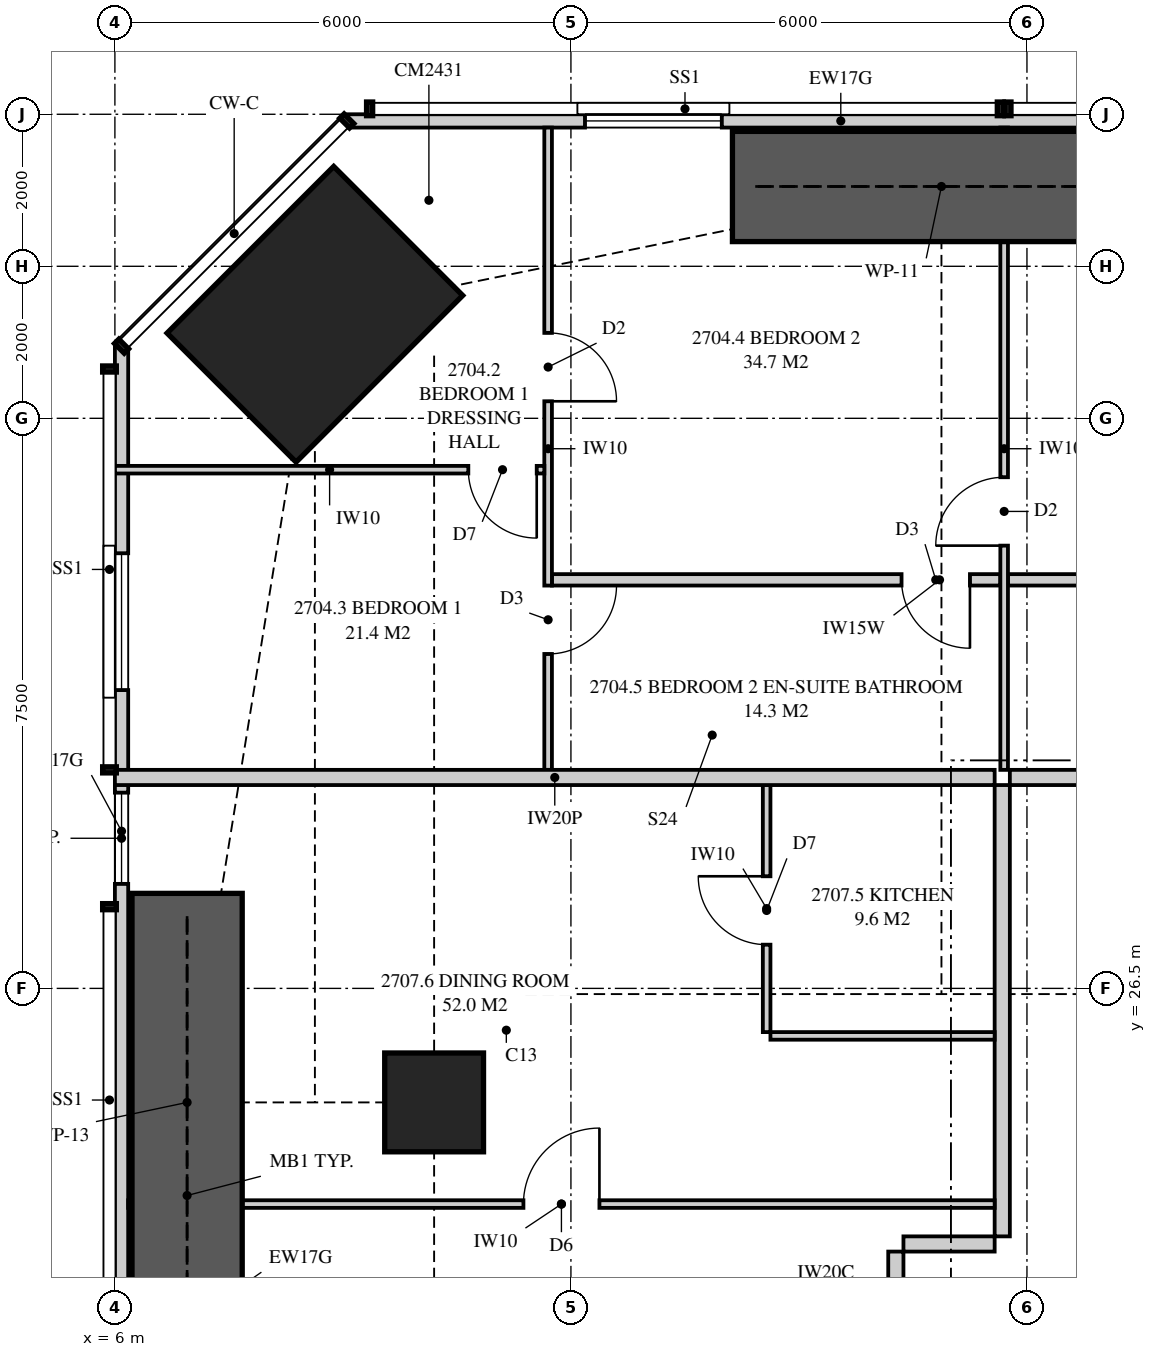
"""IFC4 building model, lengths in metres.
Left out: names, types, materials, properties, quantities, classifications, styles, units other than length and angle.
Written with IfcOpenShell. Run it as: python <this file> out.ifc"""

import sys

from ifc_helpers import new_model, si_unit, direction, frame, frame_2d, origin, origin_2d, place, context, subcontext, project, spatial, polyline, rectangle, outline, extrude, element, fill, save


model = new_model("IFC4")
c1 = context("Model", 3, precision=1e-05, world=origin(), true_north=direction((0.0, 1.0)))
c2 = subcontext(c1, "Body", "Model", "MODEL_VIEW")
j1 = project(units=[si_unit("LENGTHUNIT", "METRE"), si_unit("PLANEANGLEUNIT", "RADIAN")], contexts=[c1])
p1 = place(None, origin())
s1 = spatial("IfcSite", under=j1, at=p1, CompositionType="ELEMENT")
p2 = place(p1, origin())
s2 = spatial("IfcBuilding", under=s1, at=p2, CompositionType="ELEMENT")
p3 = place(p2, frame((0.0, 0.0, 101.5)))
s3 = spatial("IfcBuildingStorey", under=s2, at=p3, CompositionType="ELEMENT", Elevation=101.5)
p4 = place(p3, frame((8.631, 35.369, 0.0), z_axis=(0.0, 0.0, 1.0), x_axis=(0.707106781187, -0.707106781187, 0.0)))
e1 = element("IfcColumn", 1, at=p4, inside=s3, PredefinedType="COLUMN", context=c2, shape_type="SweptSolid", body=[
    extrude(rectangle(XDim=2.4, YDim=3.1, at=origin_2d()), origin(), (0.0, 0.0, 1.0), 3.35),
])
p5 = place(p3, frame((10.2, 25.0, 0.0), z_axis=(0.0, 0.0, 1.0), x_axis=(1.0, 0.0, 0.0)))
e2 = element("IfcColumn", 2, at=p5, inside=s3, PredefinedType="COLUMN", context=c2, shape_type="SweptSolid", body=[
    extrude(rectangle(XDim=1.3, YDim=1.3, at=origin_2d()), origin(), (0.0, 0.0, 1.0), 3.35),
])
p6 = place(p3, frame((22.05, 37.913, 0.0), z_axis=(0.0, 0.0, 1.0), x_axis=(-1.0, 0.0, 0.0)))
e3 = element("IfcWall", 3, at=p6, inside=s3, PredefinedType="SOLIDWALL", context=c2, shape_type="SweptSolid", body=[
    extrude(outline(polyline([(0.0, 0.0), (12.999, 0.0), (12.999, 3.11), (5.378, 3.11), (5.378, 2.15), (5.333, 2.15), (5.333, 3.11), (5.175, 3.11), (5.175, 2.15), (0.0, 2.15), (0.0, 0.0)])), frame((0.0, 0.087, 0.0), z_axis=(0.0, -1.0, 0.0), x_axis=(1.0, 0.0, 0.0)), (0.0, 0.0, 1.0), 0.175),
])
p7 = place(p6, frame((0.492, 0.0, 0.4)))
e4 = element("IfcOpeningElement", 4, at=p7, cuts=e3, PredefinedType="OPENING", context=c2, shape_type="SweptSolid", body=[
    extrude(rectangle(XDim=1.8, YDim=1.7, at=frame_2d((0.9, 0.85))), frame((0.0, 0.097, 0.0), z_axis=(0.0, -1.0, 0.0), x_axis=(1.0, 0.0, 0.0)), (0.0, 0.0, 1.0), 0.195),
])
p8 = place(p6, frame((8.065, 0.0, 0.4)))
e5 = element("IfcOpeningElement", 5, at=p8, cuts=e3, PredefinedType="OPENING", context=c2, shape_type="SweptSolid", body=[
    extrude(rectangle(XDim=1.8, YDim=1.7, at=frame_2d((0.9, 0.85))), frame((0.0, 0.097, 0.0), z_axis=(0.0, -1.0, 0.0), x_axis=(1.0, 0.0, 0.0)), (0.0, 0.0, 1.0), 0.195),
])
p9 = place(p3, frame((6.087, 34.949, 0.0), z_axis=(0.0, 0.0, 1.0), x_axis=(0.0, -1.0, 0.0)))
e6 = element("IfcWall", 6, at=p9, inside=s3, PredefinedType="SOLIDWALL", context=c2, shape_type="SweptSolid", body=[
    extrude(outline(polyline([(0.0, 0.0), (12.761, 0.0), (12.761, 2.15), (9.949, 2.15), (9.949, 3.11), (9.823, 3.11), (9.823, 2.15), (9.73, 2.15), (9.73, 3.11), (0.0, 3.11), (0.0, 0.0)])), frame((0.0, 0.087, 0.0), z_axis=(0.0, -1.0, 0.0), x_axis=(1.0, 0.0, 0.0)), (0.0, 0.0, 1.0), 0.175),
])
p10 = place(p9, frame((2.724, 0.0, 0.4)))
e7 = element("IfcOpeningElement", 7, at=p10, cuts=e6, PredefinedType="OPENING", context=c2, shape_type="SweptSolid", body=[
    extrude(rectangle(XDim=1.8, YDim=1.7, at=frame_2d((0.9, 0.85))), frame((0.0, 0.097, 0.0), z_axis=(0.0, -1.0, 0.0), x_axis=(1.0, 0.0, 0.0)), (0.0, 0.0, 1.0), 0.195),
])
p11 = place(p9, frame((5.874, 0.0, 0.4)))
e8 = element("IfcOpeningElement", 8, at=p11, cuts=e6, PredefinedType="OPENING", context=c2, shape_type="SweptSolid", body=[
    extrude(rectangle(XDim=1.2, YDim=1.7, at=frame_2d((0.6, 0.85))), frame((0.0, 0.097, 0.0), z_axis=(0.0, -1.0, 0.0), x_axis=(1.0, 0.0, 0.0)), (0.0, 0.0, 1.0), 0.195),
])
p12 = place(p3, frame((17.775, 29.275, 0.0), z_axis=(0.0, 0.0, 1.0), x_axis=(1.0, 0.0, 0.0)))
e9 = element("IfcWall", 9, at=p12, inside=s3, PredefinedType="PARTITIONING", context=c2, shape_type="SweptSolid", body=[
    extrude(rectangle(XDim=4.325, YDim=0.2, at=frame_2d((2.163, 0.0))), origin(), (0.0, 0.0, 1.0), 3.11),
])
p13 = place(p3, frame((11.7, 37.825, 0.0), z_axis=(0.0, 0.0, 1.0), x_axis=(0.0, -1.0, 0.0)))
e10 = element("IfcWall", 10, at=p13, inside=s3, PredefinedType="PARTITIONING", context=c2, shape_type="SweptSolid", body=[
    extrude(outline(polyline([(0.0, 0.0), (8.45, 0.0), (8.45, 3.11), (2.708, 3.11), (2.708, 2.15), (0.953, 2.15), (0.953, 3.11), (0.0, 3.11), (0.0, 0.0)])), frame((0.0, 0.05, 0.0), z_axis=(0.0, -1.0, 0.0), x_axis=(1.0, 0.0, 0.0)), (0.0, 0.0, 1.0), 0.1),
])
p14 = place(p13, frame((2.701, 0.0, 0.0)))
e11 = element("IfcOpeningElement", 11, at=p14, cuts=e10, PredefinedType="OPENING", context=c2, shape_type="SweptSolid", body=[
    extrude(rectangle(XDim=0.9, YDim=2.1, at=frame_2d((0.45, 1.05))), frame((0.0, 0.06, 0.0), z_axis=(0.0, -1.0, 0.0), x_axis=(1.0, 0.0, 0.0)), (0.0, 0.0, 1.0), 0.12),
])
p15 = place(p13, frame((6.025, 0.0, 0.0)))
e12 = element("IfcOpeningElement", 12, at=p15, cuts=e10, PredefinedType="OPENING", context=c2, shape_type="SweptSolid", body=[
    extrude(rectangle(XDim=0.9, YDim=2.1, at=frame_2d((0.45, 1.05))), frame((0.0, 0.06, 0.0), z_axis=(0.0, -1.0, 0.0), x_axis=(1.0, 0.0, 0.0)), (0.0, 0.0, 1.0), 0.12),
])
p16 = place(p3, frame((17.7, 37.825, 0.0), z_axis=(0.0, 0.0, 1.0), x_axis=(0.0, -1.0, 0.0)))
e13 = element("IfcWall", 13, at=p16, inside=s3, PredefinedType="PARTITIONING", context=c2, shape_type="SweptSolid", body=[
    extrude(outline(polyline([(1.635, 2.15), (0.0, 2.15), (0.0, 0.0), (8.45, 0.0), (8.45, 3.11), (1.635, 3.11), (1.635, 2.15)]), holes=[polyline([(1.021, 0.116), (0.529, 0.116), (0.529, 0.906), (1.021, 0.906), (1.021, 0.116)]), polyline([(1.021, 1.244), (0.529, 1.244), (0.529, 2.034), (1.021, 2.034), (1.021, 1.244)])]), frame((0.0, 0.05, 0.0), z_axis=(0.0, -1.0, 0.0), x_axis=(1.0, 0.0, 0.0)), (0.0, 0.0, 1.0), 0.1),
])
p17 = place(p16, frame((4.6, 0.0, 0.0)))
e14 = element("IfcOpeningElement", 14, at=p17, cuts=e13, PredefinedType="OPENING", context=c2, shape_type="SweptSolid", body=[
    extrude(rectangle(XDim=0.9, YDim=2.1, at=frame_2d((0.45, 1.05))), frame((0.0, 0.06, 0.0), z_axis=(0.0, -1.0, 0.0), x_axis=(1.0, 0.0, 0.0)), (0.0, 0.0, 1.0), 0.12),
])
p18 = place(p3, frame((6.0, 33.324, 0.0), z_axis=(0.0, 0.0, 1.0), x_axis=(1.0, 0.0, 0.0)))
e15 = element("IfcWall", 15, at=p18, inside=s3, PredefinedType="PARTITIONING", context=c2, shape_type="SweptSolid", body=[
    extrude(outline(polyline([(0.0, 0.0), (5.65, 0.0), (5.65, 3.11), (5.46, 3.11), (5.46, 2.51), (3.171, 2.51), (3.171, 2.15), (1.429, 2.15), (1.429, 3.11), (0.0, 3.11), (0.0, 0.0)])), frame((0.0, 0.05, 0.0), z_axis=(0.0, -1.0, 0.0), x_axis=(1.0, 0.0, 0.0)), (0.0, 0.0, 1.0), 0.1),
])
p19 = place(p18, frame((4.65, 0.0, 0.0)))
e16 = element("IfcOpeningElement", 16, at=p19, cuts=e15, PredefinedType="OPENING", context=c2, shape_type="SweptSolid", body=[
    extrude(rectangle(XDim=0.9, YDim=2.1, at=frame_2d((0.45, 1.05))), frame((0.0, 0.06, 0.0), z_axis=(0.0, -1.0, 0.0), x_axis=(1.0, 0.0, 0.0)), (0.0, 0.0, 1.0), 0.12),
])
p20 = place(p3, frame((11.75, 31.875, 0.0), z_axis=(0.0, 0.0, 1.0), x_axis=(1.0, 0.0, 0.0)))
e17 = element("IfcWall", 17, at=p20, inside=s3, PredefinedType="PLUMBINGWALL", context=c2, shape_type="SweptSolid", body=[
    extrude(outline(polyline([(0.0, 0.0), (5.9, 0.0), (5.9, 3.11), (5.438, 3.11), (5.438, 2.541), (4.812, 2.541), (4.812, 3.11), (0.0, 3.11), (0.0, 0.0)])), frame((0.0, 0.075, 0.0), z_axis=(0.0, -1.0, 0.0), x_axis=(1.0, 0.0, 0.0)), (0.0, 0.0, 1.0), 0.15),
])
p21 = place(p20, frame((4.6, 0.0, 0.0)))
e18 = element("IfcOpeningElement", 18, at=p21, cuts=e17, PredefinedType="OPENING", context=c2, shape_type="SweptSolid", body=[
    extrude(rectangle(XDim=0.9, YDim=2.1, at=frame_2d((0.45, 1.05))), frame((0.0, 0.085, 0.0), z_axis=(0.0, -1.0, 0.0), x_axis=(1.0, 0.0, 0.0)), (0.0, 0.0, 1.0), 0.17),
])
p22 = place(p3, frame((17.75, 31.875, 0.0), z_axis=(0.0, 0.0, 1.0), x_axis=(1.0, 0.0, 0.0)))
e19 = element("IfcWall", 19, at=p22, inside=s3, PredefinedType="PLUMBINGWALL", context=c2, shape_type="SweptSolid", body=[
    extrude(rectangle(XDim=4.2, YDim=0.15, at=frame_2d((2.1, 0.0))), origin(), (0.0, 0.0, 1.0), 3.11),
])
p23 = place(p3, frame((6.0, 29.275, 0.0), z_axis=(0.0, 0.0, 1.0), x_axis=(1.0, 0.0, 0.0)))
e20 = element("IfcWall", 20, at=p23, inside=s3, PredefinedType="PARTITIONING", context=c2, shape_type="SweptSolid", body=[
    extrude(outline(polyline([(0.0, 0.0), (11.575, 0.0), (11.575, 3.11), (11.212, 3.11), (11.212, 2.541), (10.538, 2.541), (10.538, 3.11), (5.51, 3.11), (5.51, 2.51), (2.969, 2.51), (2.969, 2.541), (2.565, 2.541), (2.565, 2.15), (0.721, 2.15), (0.721, 3.11), (0.0, 3.11), (0.0, 0.0)])), frame((0.0, 0.1, 0.0), z_axis=(0.0, -1.0, 0.0), x_axis=(1.0, 0.0, 0.0)), (0.0, 0.0, 1.0), 0.2),
])
p24 = place(p3, frame((14.575, 25.925, 0.0), z_axis=(0.0, 0.0, 1.0), x_axis=(0.0, 1.0, 0.0)))
e21 = element("IfcWall", 21, at=p24, inside=s3, PredefinedType="PARTITIONING", context=c2, shape_type="SweptSolid", body=[
    extrude(outline(polyline([(0.0, 0.0), (3.25, 0.0), (3.25, 3.11), (0.787, 3.11), (0.787, 2.541), (0.213, 2.541), (0.213, 3.11), (0.0, 3.11), (0.0, 0.0)])), frame((0.0, 0.05, 0.0), z_axis=(0.0, -1.0, 0.0), x_axis=(1.0, 0.0, 0.0)), (0.0, 0.0, 1.0), 0.1),
])
p25 = place(p24, frame((1.15, 0.0, 0.0)))
e22 = element("IfcOpeningElement", 22, at=p25, cuts=e21, PredefinedType="OPENING", context=c2, shape_type="SweptSolid", body=[
    extrude(rectangle(XDim=0.9, YDim=2.1, at=frame_2d((0.45, 1.05))), frame((0.0, 0.06, 0.0), z_axis=(0.0, -1.0, 0.0), x_axis=(1.0, 0.0, 0.0)), (0.0, 0.0, 1.0), 0.12),
])
p26 = place(p3, frame((14.625, 25.875, 0.0), z_axis=(0.0, 0.0, 1.0), x_axis=(1.0, 0.0, 0.0)))
e23 = element("IfcWall", 23, at=p26, inside=s3, PredefinedType="PARTITIONING", context=c2, shape_type="SweptSolid", body=[
    extrude(rectangle(XDim=2.95, YDim=0.1, at=frame_2d((1.475, 0.0))), origin(), (0.0, 0.0, 1.0), 3.11),
])
p27 = place(p3, frame((6.175, 23.663, 0.0), z_axis=(0.0, 0.0, 1.0), x_axis=(1.0, 0.0, 0.0)))
e24 = element("IfcWall", 24, at=p27, inside=s3, PredefinedType="PARTITIONING", context=c2, shape_type="SweptSolid", body=[
    extrude(outline(polyline([(0.529, 2.15), (0.0, 2.15), (0.0, 0.0), (0.529, 0.0), (0.529, 0.555), (1.021, 0.555), (1.021, 0.0), (11.4, 0.0), (11.4, 3.11), (5.285, 3.11), (5.285, 2.51), (2.765, 2.51), (2.765, 3.11), (1.635, 3.11), (1.635, 2.15), (1.021, 2.15), (1.021, 1.594), (0.529, 1.594), (0.529, 2.15)])), frame((0.0, 0.05, 0.0), z_axis=(0.0, -1.0, 0.0), x_axis=(1.0, 0.0, 0.0)), (0.0, 0.0, 1.0), 0.1),
])
p28 = place(p27, frame((5.2, 0.0, 0.0)))
e25 = element("IfcOpeningElement", 25, at=p28, cuts=e24, PredefinedType="OPENING", context=c2, shape_type="SweptSolid", body=[
    extrude(rectangle(XDim=1.0, YDim=2.1, at=frame_2d((0.5, 1.05))), frame((0.0, 0.06, 0.0), z_axis=(0.0, -1.0, 0.0), x_axis=(1.0, 0.0, 0.0)), (0.0, 0.0, 1.0), 0.12),
])
p29 = place(p3, frame((17.675, 23.238, 0.0), z_axis=(0.0, 0.0, 1.0), x_axis=(0.0, 1.0, 0.0)))
e26 = element("IfcWall", 26, at=p29, inside=s3, PredefinedType="PARTITIONING", context=c2, shape_type="SweptSolid", body=[
    extrude(outline(polyline([(0.0, 0.0), (5.938, 0.0), (5.938, 3.11), (3.525, 3.11), (3.525, 2.541), (2.85, 2.541), (2.85, 3.11), (0.0, 3.11), (0.0, 0.0)])), frame((0.0, 0.1, 0.0), z_axis=(0.0, -1.0, 0.0), x_axis=(1.0, 0.0, 0.0)), (0.0, 0.0, 1.0), 0.2),
])
p30 = place(p3, frame((16.275, 20.637, 0.0), z_axis=(0.0, 0.0, 1.0), x_axis=(0.0, 1.0, 0.0)))
e27 = element("IfcWall", 27, at=p30, inside=s3, PredefinedType="PARTITIONING", context=c2, shape_type="SweptSolid", body=[
    extrude(rectangle(XDim=2.4, YDim=0.2, at=frame_2d((1.2, 0.0))), origin(), (0.0, 0.0, 1.0), 3.11),
])
p31 = place(p30, frame((0.7, 0.0, 0.0)))
e28 = element("IfcOpeningElement", 28, at=p31, cuts=e27, PredefinedType="OPENING", context=c2, shape_type="SweptSolid", body=[
    extrude(rectangle(XDim=1.05, YDim=2.2, at=frame_2d((0.525, 1.1))), frame((0.0, 0.11, 0.0), z_axis=(0.0, -1.0, 0.0), x_axis=(1.0, 0.0, 0.0)), (0.0, 0.0, 1.0), 0.22),
])
p32 = place(p3, frame((17.575, 23.137, 0.0), z_axis=(0.0, 0.0, 1.0), x_axis=(-1.0, 0.0, 0.0)))
e29 = element("IfcWall", 29, at=p32, inside=s3, PredefinedType="PARTITIONING", context=c2, shape_type="SweptSolid", body=[
    extrude(rectangle(XDim=1.2, YDim=0.2, at=frame_2d((0.6, 0.0))), origin(), (0.0, 0.0, 1.0), 3.11),
])
for number, where, z_axis, x_axis in (
    (30, (14.125, 37.05, 0.0), (0.0, 0.0, 1.0), (1.0, 0.0, 0.0)),
    (31, (6.95, 22.25, 0.0), (0.0, 0.0, 1.0), (0.0, 1.0, 0.0)),
):
    element("IfcWall", number, at=place(p3, frame(where, z_axis=z_axis, x_axis=x_axis)), inside=s3, PredefinedType="SHEAR", context=c2, shape_type="SweptSolid", body=[
        extrude(rectangle(XDim=5.5, YDim=1.45, at=frame_2d((2.75, 0.0))), origin(), (0.0, 0.0, 1.0), 3.35),
    ])
p33 = place(p8, origin())
e32 = element("IfcWindow", 32, at=p33, inside=s3, PartitioningType="SINGLE_PANEL", PredefinedType="WINDOW", context=c2, shape_type="SweptSolid", body=[
    extrude(rectangle(XDim=1.8, YDim=1.7, at=frame_2d((0.9, 0.85))), frame((0.0, 0.03, 0.0), z_axis=(0.0, -1.0, 0.0), x_axis=(1.0, 0.0, 0.0)), (0.0, 0.0, 1.0), 0.06),
])
fill(e5, e32)
p34 = place(p10, origin())
e33 = element("IfcWindow", 33, at=p34, inside=s3, PartitioningType="SINGLE_PANEL", PredefinedType="WINDOW", context=c2, shape_type="SweptSolid", body=[
    extrude(rectangle(XDim=1.8, YDim=1.7, at=frame_2d((0.9, 0.85))), frame((0.0, 0.03, 0.0), z_axis=(0.0, -1.0, 0.0), x_axis=(1.0, 0.0, 0.0)), (0.0, 0.0, 1.0), 0.06),
])
fill(e7, e33)
p35 = place(p11, origin())
e34 = element("IfcWindow", 34, at=p35, inside=s3, PartitioningType="SINGLE_PANEL", PredefinedType="WINDOW", context=c2, shape_type="SweptSolid", body=[
    extrude(rectangle(XDim=1.2, YDim=1.7, at=frame_2d((0.6, 0.85))), frame((0.0, 0.03, 0.0), z_axis=(0.0, -1.0, 0.0), x_axis=(1.0, 0.0, 0.0)), (0.0, 0.0, 1.0), 0.06),
])
fill(e8, e34)
p36 = place(p19, frame((0.9, 0.0, 0.0), z_axis=(0.0, 0.0, 1.0), x_axis=(-1.0, 0.0, 0.0)))
e35 = element("IfcDoor", 35, at=p36, inside=s3, OperationType="SINGLE_SWING_LEFT", PredefinedType="DOOR", context=c2, shape_type="SweptSolid", body=[
    extrude(rectangle(XDim=0.9, YDim=2.1, at=frame_2d((0.45, 1.05))), frame((0.0, 0.025, 0.0), z_axis=(0.0, -1.0, 0.0), x_axis=(1.0, 0.0, 0.0)), (0.0, 0.0, 1.0), 0.05),
])
fill(e16, e35)
p37 = place(p14, origin())
e36 = element("IfcDoor", 36, at=p37, inside=s3, OperationType="SINGLE_SWING_RIGHT", PredefinedType="DOOR", context=c2, shape_type="SweptSolid", body=[
    extrude(rectangle(XDim=0.9, YDim=2.1, at=frame_2d((0.45, 1.05))), frame((0.0, 0.025, 0.0), z_axis=(0.0, -1.0, 0.0), x_axis=(1.0, 0.0, 0.0)), (0.0, 0.0, 1.0), 0.05),
])
fill(e11, e36)
p38 = place(p17, frame((0.9, 0.0, 0.0), z_axis=(0.0, 0.0, 1.0), x_axis=(-1.0, 0.0, 0.0)))
e37 = element("IfcDoor", 37, at=p38, inside=s3, OperationType="SINGLE_SWING_LEFT", PredefinedType="DOOR", context=c2, shape_type="SweptSolid", body=[
    extrude(rectangle(XDim=0.9, YDim=2.1, at=frame_2d((0.45, 1.05))), frame((0.0, 0.025, 0.0), z_axis=(0.0, -1.0, 0.0), x_axis=(1.0, 0.0, 0.0)), (0.0, 0.0, 1.0), 0.05),
])
fill(e14, e37)
p39 = place(p21, frame((0.9, 0.0, 0.0), z_axis=(0.0, 0.0, 1.0), x_axis=(-1.0, 0.0, 0.0)))
e38 = element("IfcDoor", 38, at=p39, inside=s3, OperationType="SINGLE_SWING_LEFT", PredefinedType="DOOR", context=c2, shape_type="SweptSolid", body=[
    extrude(rectangle(XDim=0.9, YDim=2.1, at=frame_2d((0.45, 1.05))), frame((0.0, 0.025, 0.0), z_axis=(0.0, -1.0, 0.0), x_axis=(1.0, 0.0, 0.0)), (0.0, 0.0, 1.0), 0.05),
])
fill(e18, e38)
p40 = place(p15, origin())
e39 = element("IfcDoor", 39, at=p40, inside=s3, OperationType="SINGLE_SWING_LEFT", PredefinedType="DOOR", context=c2, shape_type="SweptSolid", body=[
    extrude(rectangle(XDim=0.9, YDim=2.1, at=frame_2d((0.45, 1.05))), frame((0.0, 0.025, 0.0), z_axis=(0.0, -1.0, 0.0), x_axis=(1.0, 0.0, 0.0)), (0.0, 0.0, 1.0), 0.05),
])
fill(e12, e39)
p41 = place(p25, origin())
e40 = element("IfcDoor", 40, at=p41, inside=s3, OperationType="SINGLE_SWING_RIGHT", PredefinedType="DOOR", context=c2, shape_type="SweptSolid", body=[
    extrude(rectangle(XDim=0.9, YDim=2.1, at=frame_2d((0.45, 1.05))), frame((0.0, 0.025, 0.0), z_axis=(0.0, -1.0, 0.0), x_axis=(1.0, 0.0, 0.0)), (0.0, 0.0, 1.0), 0.05),
])
fill(e22, e40)
p42 = place(p28, origin())
e41 = element("IfcDoor", 41, at=p42, inside=s3, OperationType="SINGLE_SWING_RIGHT", PredefinedType="DOOR", context=c2, shape_type="SweptSolid", body=[
    extrude(rectangle(XDim=1.0, YDim=2.1, at=frame_2d((0.5, 1.05))), frame((0.0, 0.025, 0.0), z_axis=(0.0, -1.0, 0.0), x_axis=(1.0, 0.0, 0.0)), (0.0, 0.0, 1.0), 0.05),
])
fill(e25, e41)
save(model, sys.argv[1])
